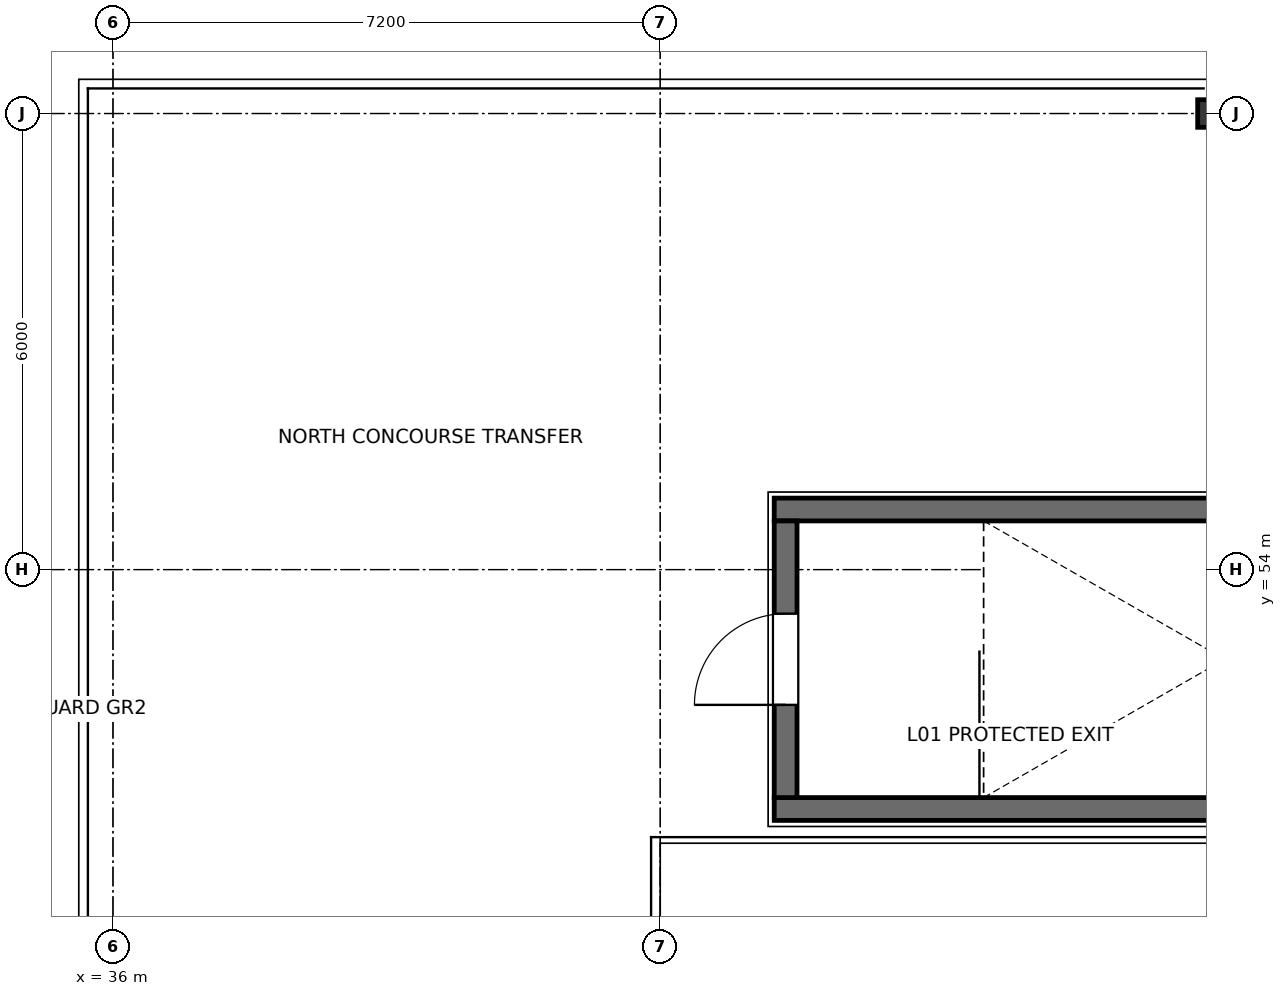
"""IFC4 building model, lengths in metres.
Left out: names, types, materials, properties, quantities, classifications, styles, units other than length and angle.
Written with IfcOpenShell. Run it as: python <this file> out.ifc"""

import sys

from ifc_helpers import new_model, si_unit, direction, frame, frame_2d, origin, origin_2d, place, context, subcontext, project, spatial, rectangle, i_section, extrude, element, fill, save


model = new_model("IFC4")
c1 = context("Model", 3, precision=1e-05, world=origin(), true_north=direction((0.0, 1.0)))
c2 = subcontext(c1, "Body", "Model", "MODEL_VIEW")
j1 = project(units=[si_unit("LENGTHUNIT", "METRE"), si_unit("PLANEANGLEUNIT", "RADIAN")], contexts=[c1])
p1 = place(None, origin())
s1 = spatial("IfcSite", under=j1, at=p1, CompositionType="ELEMENT")
p2 = place(p1, origin())
s2 = spatial("IfcBuilding", under=s1, at=p2, CompositionType="ELEMENT")
p3 = place(p2, frame((0.0, 0.0, 5.4)))
s3 = spatial("IfcBuildingStorey", under=s2, at=p3, CompositionType="ELEMENT", Elevation=5.4)
p4 = place(p3, frame((50.4, 60.0, 0.6), z_axis=(0.0, 0.0, 1.0), x_axis=(1.0, 0.0, 0.0)))
e1 = element("IfcColumn", 1, at=p4, inside=s3, PredefinedType="COLUMN", context=c2, shape_type="SweptSolid", body=[
    extrude(i_section(OverallWidth=0.257, OverallDepth=0.363, WebThickness=0.013, FlangeThickness=0.022, FilletRadius=0.015, at=origin_2d()), origin(), (0.0, 0.0, 1.0), 2.6),
])
for number, where, z_axis, x_axis in (
    (2, (54.1, 50.85, 0.0), (0.0, 0.0, 1.0), (-1.0, 0.0, 0.0)),
    (3, (44.7, 54.79, 0.0), (0.0, 0.0, 1.0), (1.0, 0.0, 0.0)),
):
    element("IfcWall", number, at=place(p3, frame(where, z_axis=z_axis, x_axis=x_axis)), inside=s3, PredefinedType="SOLIDWALL", context=c2, shape_type="SweptSolid", body=[
        extrude(rectangle(XDim=9.4, YDim=0.3, at=frame_2d((4.7, 0.0))), origin(), (0.0, 0.0, 1.0), 3.2),
    ])
p5 = place(p3, frame((44.85, 51.0, 0.0), z_axis=(0.0, 0.0, 1.0), x_axis=(0.0, 1.0, 0.0)))
e4 = element("IfcWall", 4, at=p5, inside=s3, PredefinedType="SOLIDWALL", context=c2, shape_type="SweptSolid", body=[
    extrude(rectangle(XDim=3.64, YDim=0.3, at=frame_2d((1.82, 0.0))), origin(), (0.0, 0.0, 1.0), 3.2),
])
p6 = place(p5, frame((1.22, 0.0, 0.0)))
e5 = element("IfcOpeningElement", 5, at=p6, cuts=e4, PredefinedType="OPENING", context=c2, shape_type="SweptSolid", body=[
    extrude(rectangle(XDim=1.2, YDim=2.2, at=frame_2d((0.6, 1.1))), frame((0.0, 0.16, 0.0), z_axis=(0.0, -1.0, 0.0), x_axis=(1.0, 0.0, 0.0)), (0.0, 0.0, 1.0), 0.32),
])
p7 = place(p6, origin())
e6 = element("IfcDoor", 6, at=p7, inside=s3, OperationType="SINGLE_SWING_LEFT", PredefinedType="DOOR", context=c2, shape_type="SweptSolid", body=[
    extrude(rectangle(XDim=1.2, YDim=2.2, at=frame_2d((0.6, 1.1))), frame((0.0, 0.025, 0.0), z_axis=(0.0, -1.0, 0.0), x_axis=(1.0, 0.0, 0.0)), (0.0, 0.0, 1.0), 0.05),
])
fill(e5, e6)
save(model, sys.argv[1])
